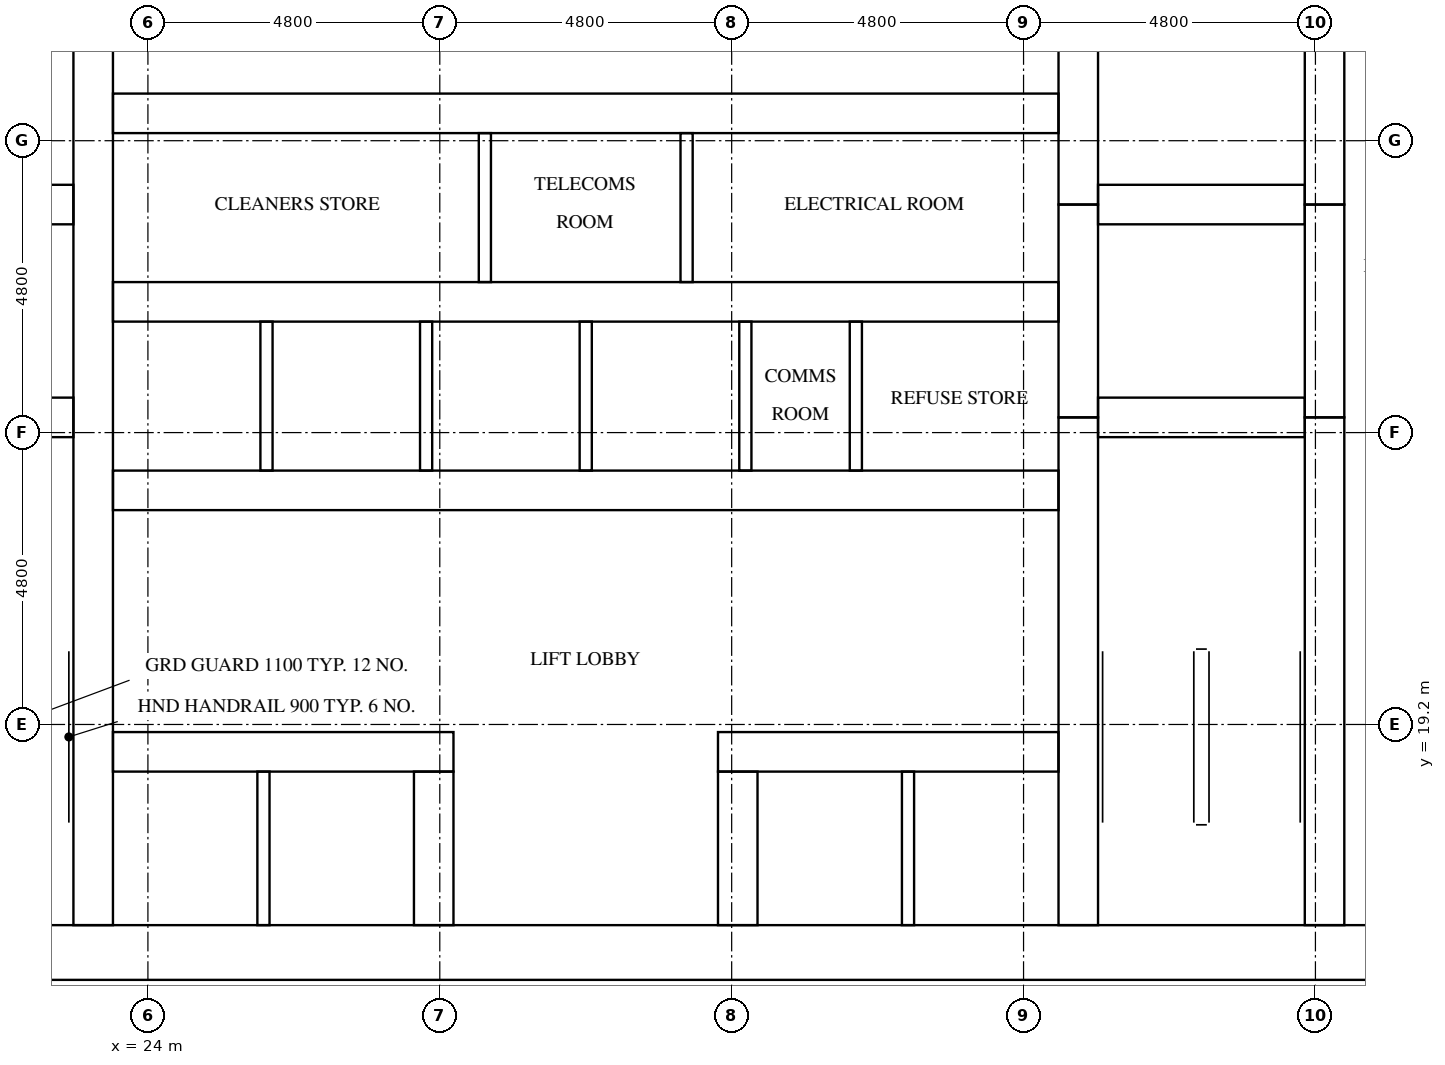
"""IFC4 building model, lengths in metres.
Left out: names, types, materials, properties, quantities, classifications, styles, units other than length and angle.
Written with IfcOpenShell. Run it as: python <this file> out.ifc"""

import sys

from ifc_helpers import new_model, si_unit, direction, frame, frame_2d, origin, place, context, subcontext, project, spatial, rectangle, extrude, element, fill, save


model = new_model("IFC4")
c1 = context("Model", 3, precision=1e-05, world=origin(), true_north=direction((0.0, 1.0)))
c2 = subcontext(c1, "Body", "Model", "MODEL_VIEW")
j1 = project(units=[si_unit("LENGTHUNIT", "METRE"), si_unit("PLANEANGLEUNIT", "RADIAN")], contexts=[c1])
p1 = place(None, origin())
s1 = spatial("IfcSite", under=j1, at=p1, CompositionType="ELEMENT")
p2 = place(p1, origin())
s2 = spatial("IfcBuilding", under=s1, at=p2, CompositionType="ELEMENT")
p3 = place(p2, frame((0.0, 0.0, 66.3)))
s3 = spatial("IfcBuildingStorey", under=s2, at=p3, CompositionType="ELEMENT", Elevation=66.3)
p4 = place(p3, frame((15.0, 15.45, 0.0), z_axis=(0.0, 0.0, 1.0), x_axis=(1.0, 0.0, 0.0)))
e1 = element("IfcWall", 1, at=p4, inside=s3, PredefinedType="SHEAR", context=c2, shape_type="SweptSolid", body=[
    extrude(rectangle(XDim=32.4, YDim=0.9, at=frame_2d((16.2, 0.0))), origin(), (0.0, 0.0, 1.0), 3.2),
])
p5 = place(p4, frame((15.3, 0.0, 0.0)))
e2 = element("IfcOpeningElement", 2, at=p5, cuts=e1, PredefinedType="OPENING", context=c2, shape_type="SweptSolid", body=[
    extrude(rectangle(XDim=1.8, YDim=2.1, at=frame_2d((0.9, 1.05))), frame((0.0, 0.46, 0.0), z_axis=(0.0, -1.0, 0.0), x_axis=(1.0, 0.0, 0.0)), (0.0, 0.0, 1.0), 0.92),
])
p6 = place(p3, frame((23.1, 15.9, 0.0), z_axis=(0.0, 0.0, 1.0), x_axis=(0.0, 1.0, 0.0)))
e3 = element("IfcWall", 3, at=p6, inside=s3, PredefinedType="SHEAR", context=c2, shape_type="SweptSolid", body=[
    extrude(rectangle(XDim=21.0, YDim=0.65, at=frame_2d((10.5, 0.0))), origin(), (0.0, 0.0, 1.0), 3.2),
])
p7 = place(p3, frame((39.3, 15.9, 0.0), z_axis=(0.0, 0.0, 1.0), x_axis=(0.0, 1.0, 0.0)))
e4 = element("IfcWall", 4, at=p7, inside=s3, PredefinedType="SHEAR", context=c2, shape_type="SweptSolid", body=[
    extrude(rectangle(XDim=8.35, YDim=0.65, at=frame_2d((4.175, 0.0))), origin(), (0.0, 0.0, 1.0), 3.2),
])
p8 = place(p3, frame((39.3, 24.25, 0.0), z_axis=(0.0, 0.0, 1.0), x_axis=(0.0, 1.0, 0.0)))
e5 = element("IfcWall", 5, at=p8, inside=s3, PredefinedType="SHEAR", context=c2, shape_type="SweptSolid", body=[
    extrude(rectangle(XDim=3.5, YDim=0.65, at=frame_2d((1.75, 0.0))), origin(), (0.0, 0.0, 1.0), 3.2),
])
p9 = place(p3, frame((39.3, 27.75, 0.0), z_axis=(0.0, 0.0, 1.0), x_axis=(0.0, 1.0, 0.0)))
e6 = element("IfcWall", 6, at=p9, inside=s3, PredefinedType="SHEAR", context=c2, shape_type="SweptSolid", body=[
    extrude(rectangle(XDim=9.15, YDim=0.65, at=frame_2d((4.575, 0.0))), origin(), (0.0, 0.0, 1.0), 3.2),
])
p10 = place(p3, frame((43.35, 15.9, 0.0), z_axis=(0.0, 0.0, 1.0), x_axis=(0.0, 1.0, 0.0)))
e7 = element("IfcWall", 7, at=p10, inside=s3, PredefinedType="SHEAR", context=c2, shape_type="SweptSolid", body=[
    extrude(rectangle(XDim=8.35, YDim=0.65, at=frame_2d((4.175, 0.0))), origin(), (0.0, 0.0, 1.0), 3.2),
])
p11 = place(p10, frame((0.3, 0.0, 0.0)))
e8 = element("IfcOpeningElement", 8, at=p11, cuts=e7, PredefinedType="OPENING", context=c2, shape_type="SweptSolid", body=[
    extrude(rectangle(XDim=1.2, YDim=2.1, at=frame_2d((0.6, 1.05))), frame((0.0, 0.335, 0.0), z_axis=(0.0, -1.0, 0.0), x_axis=(1.0, 0.0, 0.0)), (0.0, 0.0, 1.0), 0.67),
])
p12 = place(p3, frame((43.35, 24.25, 0.0), z_axis=(0.0, 0.0, 1.0), x_axis=(0.0, 1.0, 0.0)))
e9 = element("IfcWall", 9, at=p12, inside=s3, PredefinedType="SHEAR", context=c2, shape_type="SweptSolid", body=[
    extrude(rectangle(XDim=3.5, YDim=0.65, at=frame_2d((1.75, 0.0))), origin(), (0.0, 0.0, 1.0), 3.2),
])
p13 = place(p12, frame((1.2, 0.0, 0.0)))
e10 = element("IfcOpeningElement", 10, at=p13, cuts=e9, PredefinedType="OPENING", context=c2, shape_type="SweptSolid", body=[
    extrude(rectangle(XDim=1.1, YDim=2.1, at=frame_2d((0.55, 1.05))), frame((0.0, 0.335, 0.0), z_axis=(0.0, -1.0, 0.0), x_axis=(1.0, 0.0, 0.0)), (0.0, 0.0, 1.0), 0.67),
])
p14 = place(p3, frame((43.35, 27.75, 0.0), z_axis=(0.0, 0.0, 1.0), x_axis=(0.0, 1.0, 0.0)))
e11 = element("IfcWall", 11, at=p14, inside=s3, PredefinedType="SHEAR", context=c2, shape_type="SweptSolid", body=[
    extrude(rectangle(XDim=9.15, YDim=0.65, at=frame_2d((4.575, 0.0))), origin(), (0.0, 0.0, 1.0), 3.2),
])
p15 = place(p14, frame((7.65, 0.0, 0.0)))
e12 = element("IfcOpeningElement", 12, at=p15, cuts=e11, PredefinedType="OPENING", context=c2, shape_type="SweptSolid", body=[
    extrude(rectangle(XDim=1.2, YDim=2.1, at=frame_2d((0.6, 1.05))), frame((0.0, 0.335, 0.0), z_axis=(0.0, -1.0, 0.0), x_axis=(1.0, 0.0, 0.0)), (0.0, 0.0, 1.0), 0.67),
])
for number, where, z_axis, x_axis in (
    (13, (19.375, 24.25, 0.0), (0.0, 0.0, 1.0), (1.0, 0.0, 0.0)),
    (14, (19.375, 27.75, 0.0), (0.0, 0.0, 1.0), (1.0, 0.0, 0.0)),
    (15, (39.625, 24.25, 0.0), (0.0, 0.0, 1.0), (1.0, 0.0, 0.0)),
    (16, (39.625, 27.75, 0.0), (0.0, 0.0, 1.0), (1.0, 0.0, 0.0)),
):
    element("IfcWall", number, at=place(p3, frame(where, z_axis=z_axis, x_axis=x_axis)), inside=s3, PredefinedType="SHEAR", context=c2, shape_type="SweptSolid", body=[
        extrude(rectangle(XDim=3.4, YDim=0.65, at=frame_2d((1.7, 0.0))), origin(), (0.0, 0.0, 1.0), 3.2),
    ])
p16 = place(p3, frame((23.425, 18.75, 0.0), z_axis=(0.0, 0.0, 1.0), x_axis=(1.0, 0.0, 0.0)))
e17 = element("IfcWall", 17, at=p16, inside=s3, PredefinedType="SHEAR", context=c2, shape_type="SweptSolid", body=[
    extrude(rectangle(XDim=5.6, YDim=0.65, at=frame_2d((2.8, 0.0))), origin(), (0.0, 0.0, 1.0), 3.2),
])
p17 = place(p16, frame((0.637, 0.0, 0.0)))
e18 = element("IfcOpeningElement", 18, at=p17, cuts=e17, PredefinedType="OPENING", context=c2, shape_type="SweptSolid", body=[
    extrude(rectangle(XDim=1.1, YDim=2.1, at=frame_2d((0.55, 1.05))), frame((0.0, 0.335, 0.0), z_axis=(0.0, -1.0, 0.0), x_axis=(1.0, 0.0, 0.0)), (0.0, 0.0, 1.0), 0.67),
])
p18 = place(p16, frame((3.212, 0.0, 0.0)))
e19 = element("IfcOpeningElement", 19, at=p18, cuts=e17, PredefinedType="OPENING", context=c2, shape_type="SweptSolid", body=[
    extrude(rectangle(XDim=1.1, YDim=2.1, at=frame_2d((0.55, 1.05))), frame((0.0, 0.335, 0.0), z_axis=(0.0, -1.0, 0.0), x_axis=(1.0, 0.0, 0.0)), (0.0, 0.0, 1.0), 0.67),
])
p19 = place(p3, frame((33.375, 18.75, 0.0), z_axis=(0.0, 0.0, 1.0), x_axis=(1.0, 0.0, 0.0)))
e20 = element("IfcWall", 20, at=p19, inside=s3, PredefinedType="SHEAR", context=c2, shape_type="SweptSolid", body=[
    extrude(rectangle(XDim=5.6, YDim=0.65, at=frame_2d((2.8, 0.0))), origin(), (0.0, 0.0, 1.0), 3.2),
])
p20 = place(p19, frame((1.288, 0.0, 0.0)))
e21 = element("IfcOpeningElement", 21, at=p20, cuts=e20, PredefinedType="OPENING", context=c2, shape_type="SweptSolid", body=[
    extrude(rectangle(XDim=1.1, YDim=2.1, at=frame_2d((0.55, 1.05))), frame((0.0, 0.335, 0.0), z_axis=(0.0, -1.0, 0.0), x_axis=(1.0, 0.0, 0.0)), (0.0, 0.0, 1.0), 0.67),
])
p21 = place(p19, frame((3.863, 0.0, 0.0)))
e22 = element("IfcOpeningElement", 22, at=p21, cuts=e20, PredefinedType="OPENING", context=c2, shape_type="SweptSolid", body=[
    extrude(rectangle(XDim=1.1, YDim=2.1, at=frame_2d((0.55, 1.05))), frame((0.0, 0.335, 0.0), z_axis=(0.0, -1.0, 0.0), x_axis=(1.0, 0.0, 0.0)), (0.0, 0.0, 1.0), 0.67),
])
p22 = place(p3, frame((23.425, 23.05, 0.0), z_axis=(0.0, 0.0, 1.0), x_axis=(1.0, 0.0, 0.0)))
e23 = element("IfcWall", 23, at=p22, inside=s3, PredefinedType="SHEAR", context=c2, shape_type="SweptSolid", body=[
    extrude(rectangle(XDim=15.55, YDim=0.65, at=frame_2d((7.775, 0.0))), origin(), (0.0, 0.0, 1.0), 3.2),
])
p23 = place(p22, frame((0.663, 0.0, 0.0)))
e24 = element("IfcOpeningElement", 24, at=p23, cuts=e23, PredefinedType="OPENING", context=c2, shape_type="SweptSolid", body=[
    extrude(rectangle(XDim=1.1, YDim=2.1, at=frame_2d((0.55, 1.05))), frame((0.0, 0.335, 0.0), z_axis=(0.0, -1.0, 0.0), x_axis=(1.0, 0.0, 0.0)), (0.0, 0.0, 1.0), 0.67),
])
p24 = place(p22, frame((3.288, 0.0, 0.0)))
e25 = element("IfcOpeningElement", 25, at=p24, cuts=e23, PredefinedType="OPENING", context=c2, shape_type="SweptSolid", body=[
    extrude(rectangle(XDim=1.1, YDim=2.1, at=frame_2d((0.55, 1.05))), frame((0.0, 0.335, 0.0), z_axis=(0.0, -1.0, 0.0), x_axis=(1.0, 0.0, 0.0)), (0.0, 0.0, 1.0), 0.67),
])
p25 = place(p22, frame((10.809, 0.0, 0.0)))
e26 = element("IfcOpeningElement", 26, at=p25, cuts=e23, PredefinedType="OPENING", context=c2, shape_type="SweptSolid", body=[
    extrude(rectangle(XDim=1.0, YDim=2.1, at=frame_2d((0.5, 1.05))), frame((0.0, 0.335, 0.0), z_axis=(0.0, -1.0, 0.0), x_axis=(1.0, 0.0, 0.0)), (0.0, 0.0, 1.0), 0.67),
])
p26 = place(p22, frame((13.434, 0.0, 0.0)))
e27 = element("IfcOpeningElement", 27, at=p26, cuts=e23, PredefinedType="OPENING", context=c2, shape_type="SweptSolid", body=[
    extrude(rectangle(XDim=1.0, YDim=2.1, at=frame_2d((0.5, 1.05))), frame((0.0, 0.335, 0.0), z_axis=(0.0, -1.0, 0.0), x_axis=(1.0, 0.0, 0.0)), (0.0, 0.0, 1.0), 0.67),
])
p27 = place(p3, frame((23.425, 26.15, 0.0), z_axis=(0.0, 0.0, 1.0), x_axis=(1.0, 0.0, 0.0)))
e28 = element("IfcWall", 28, at=p27, inside=s3, PredefinedType="SHEAR", context=c2, shape_type="SweptSolid", body=[
    extrude(rectangle(XDim=15.55, YDim=0.65, at=frame_2d((7.775, 0.0))), origin(), (0.0, 0.0, 1.0), 3.2),
])
p28 = place(p3, frame((23.425, 29.25, 0.0), z_axis=(0.0, 0.0, 1.0), x_axis=(1.0, 0.0, 0.0)))
e29 = element("IfcWall", 29, at=p28, inside=s3, PredefinedType="SHEAR", context=c2, shape_type="SweptSolid", body=[
    extrude(rectangle(XDim=15.55, YDim=0.65, at=frame_2d((7.775, 0.0))), origin(), (0.0, 0.0, 1.0), 3.2),
])
p29 = place(p28, frame((2.508, 0.0, 0.0)))
e30 = element("IfcOpeningElement", 30, at=p29, cuts=e29, PredefinedType="OPENING", context=c2, shape_type="SweptSolid", body=[
    extrude(rectangle(XDim=1.0, YDim=2.1, at=frame_2d((0.5, 1.05))), frame((0.0, 0.335, 0.0), z_axis=(0.0, -1.0, 0.0), x_axis=(1.0, 0.0, 0.0)), (0.0, 0.0, 1.0), 0.67),
])
p30 = place(p28, frame((7.275, 0.0, 0.0)))
e31 = element("IfcOpeningElement", 31, at=p30, cuts=e29, PredefinedType="OPENING", context=c2, shape_type="SweptSolid", body=[
    extrude(rectangle(XDim=1.0, YDim=2.1, at=frame_2d((0.5, 1.05))), frame((0.0, 0.335, 0.0), z_axis=(0.0, -1.0, 0.0), x_axis=(1.0, 0.0, 0.0)), (0.0, 0.0, 1.0), 0.67),
])
p31 = place(p28, frame((12.042, 0.0, 0.0)))
e32 = element("IfcOpeningElement", 32, at=p31, cuts=e29, PredefinedType="OPENING", context=c2, shape_type="SweptSolid", body=[
    extrude(rectangle(XDim=1.0, YDim=2.1, at=frame_2d((0.5, 1.05))), frame((0.0, 0.335, 0.0), z_axis=(0.0, -1.0, 0.0), x_axis=(1.0, 0.0, 0.0)), (0.0, 0.0, 1.0), 0.67),
])
for number, where, z_axis, x_axis in (
    (33, (28.7, 15.9, 0.0), (0.0, 0.0, 1.0), (0.0, 1.0, 0.0)),
    (34, (33.7, 15.9, 0.0), (0.0, 0.0, 1.0), (0.0, 1.0, 0.0)),
):
    element("IfcWall", number, at=place(p3, frame(where, z_axis=z_axis, x_axis=x_axis)), inside=s3, PredefinedType="SHEAR", context=c2, shape_type="SweptSolid", body=[
        extrude(rectangle(XDim=2.525, YDim=0.65, at=frame_2d((1.263, 0.0))), origin(), (0.0, 0.0, 1.0), 3.2),
    ])
for number, where, z_axis, x_axis in (
    (35, (25.95, 23.375, 0.0), (0.0, 0.0, 1.0), (0.0, 1.0, 0.0)),
    (36, (28.575, 23.375, 0.0), (0.0, 0.0, 1.0), (0.0, 1.0, 0.0)),
    (37, (31.2, 23.375, 0.0), (0.0, 0.0, 1.0), (0.0, 1.0, 0.0)),
    (38, (33.825, 23.375, 0.0), (0.0, 0.0, 1.0), (0.0, 1.0, 0.0)),
):
    element("IfcWall", number, at=place(p3, frame(where, z_axis=z_axis, x_axis=x_axis)), inside=s3, PredefinedType="SOLIDWALL", context=c2, shape_type="SweptSolid", body=[
        extrude(rectangle(XDim=2.45, YDim=0.2, at=frame_2d((1.225, 0.0))), origin(), (0.0, 0.0, 1.0), 3.2),
    ])
for number, where, z_axis, x_axis in (
    (39, (25.9, 15.9, 0.0), (0.0, 0.0, 1.0), (0.0, 1.0, 0.0)),
    (40, (36.5, 15.9, 0.0), (0.0, 0.0, 1.0), (0.0, 1.0, 0.0)),
):
    element("IfcWall", number, at=place(p3, frame(where, z_axis=z_axis, x_axis=x_axis)), inside=s3, PredefinedType="SOLIDWALL", context=c2, shape_type="SweptSolid", body=[
        extrude(rectangle(XDim=2.525, YDim=0.2, at=frame_2d((1.263, 0.0))), origin(), (0.0, 0.0, 1.0), 3.2),
    ])
for number, where, z_axis, x_axis in (
    (41, (35.642, 23.375, 0.0), (0.0, 0.0, 1.0), (0.0, 1.0, 0.0)),
    (42, (29.541, 26.475, 0.0), (0.0, 0.0, 1.0), (0.0, 1.0, 0.0)),
    (43, (32.859, 26.475, 0.0), (0.0, 0.0, 1.0), (0.0, 1.0, 0.0)),
):
    element("IfcWall", number, at=place(p3, frame(where, z_axis=z_axis, x_axis=x_axis)), inside=s3, PredefinedType="PARTITIONING", context=c2, shape_type="SweptSolid", body=[
        extrude(rectangle(XDim=2.45, YDim=0.2, at=frame_2d((1.225, 0.0))), origin(), (0.0, 0.0, 1.0), 3.2),
    ])
p32 = place(p17, origin())
e44 = element("IfcDoor", 44, at=p32, inside=s3, OperationType="DOUBLE_DOOR_SLIDING", PredefinedType="DOOR", context=c2, shape_type="SweptSolid", body=[
    extrude(rectangle(XDim=1.1, YDim=2.1, at=frame_2d((0.55, 1.05))), frame((0.0, 0.025, 0.0), z_axis=(0.0, -1.0, 0.0), x_axis=(1.0, 0.0, 0.0)), (0.0, 0.0, 1.0), 0.05),
])
fill(e18, e44)
p33 = place(p18, origin())
e45 = element("IfcDoor", 45, at=p33, inside=s3, OperationType="DOUBLE_DOOR_SLIDING", PredefinedType="DOOR", context=c2, shape_type="SweptSolid", body=[
    extrude(rectangle(XDim=1.1, YDim=2.1, at=frame_2d((0.55, 1.05))), frame((0.0, 0.025, 0.0), z_axis=(0.0, -1.0, 0.0), x_axis=(1.0, 0.0, 0.0)), (0.0, 0.0, 1.0), 0.05),
])
fill(e19, e45)
p34 = place(p20, origin())
e46 = element("IfcDoor", 46, at=p34, inside=s3, OperationType="DOUBLE_DOOR_SLIDING", PredefinedType="DOOR", context=c2, shape_type="SweptSolid", body=[
    extrude(rectangle(XDim=1.1, YDim=2.1, at=frame_2d((0.55, 1.05))), frame((0.0, 0.025, 0.0), z_axis=(0.0, -1.0, 0.0), x_axis=(1.0, 0.0, 0.0)), (0.0, 0.0, 1.0), 0.05),
])
fill(e21, e46)
p35 = place(p21, origin())
e47 = element("IfcDoor", 47, at=p35, inside=s3, OperationType="DOUBLE_DOOR_SLIDING", PredefinedType="DOOR", context=c2, shape_type="SweptSolid", body=[
    extrude(rectangle(XDim=1.1, YDim=2.1, at=frame_2d((0.55, 1.05))), frame((0.0, 0.025, 0.0), z_axis=(0.0, -1.0, 0.0), x_axis=(1.0, 0.0, 0.0)), (0.0, 0.0, 1.0), 0.05),
])
fill(e22, e47)
p36 = place(p23, origin())
e48 = element("IfcDoor", 48, at=p36, inside=s3, OperationType="DOUBLE_DOOR_SLIDING", PredefinedType="DOOR", context=c2, shape_type="SweptSolid", body=[
    extrude(rectangle(XDim=1.1, YDim=2.1, at=frame_2d((0.55, 1.05))), frame((0.0, 0.025, 0.0), z_axis=(0.0, -1.0, 0.0), x_axis=(1.0, 0.0, 0.0)), (0.0, 0.0, 1.0), 0.05),
])
fill(e24, e48)
p37 = place(p24, origin())
e49 = element("IfcDoor", 49, at=p37, inside=s3, OperationType="DOUBLE_DOOR_SLIDING", PredefinedType="DOOR", context=c2, shape_type="SweptSolid", body=[
    extrude(rectangle(XDim=1.1, YDim=2.1, at=frame_2d((0.55, 1.05))), frame((0.0, 0.025, 0.0), z_axis=(0.0, -1.0, 0.0), x_axis=(1.0, 0.0, 0.0)), (0.0, 0.0, 1.0), 0.05),
])
fill(e25, e49)
p38 = place(p13, origin())
e50 = element("IfcDoor", 50, at=p38, inside=s3, OperationType="DOUBLE_DOOR_SLIDING", PredefinedType="DOOR", context=c2, shape_type="SweptSolid", body=[
    extrude(rectangle(XDim=1.1, YDim=2.1, at=frame_2d((0.55, 1.05))), frame((0.0, 0.025, 0.0), z_axis=(0.0, -1.0, 0.0), x_axis=(1.0, 0.0, 0.0)), (0.0, 0.0, 1.0), 0.05),
])
fill(e10, e50)
p39 = place(p11, origin())
e51 = element("IfcDoor", 51, at=p39, inside=s3, OperationType="SINGLE_SWING_LEFT", PredefinedType="DOOR", context=c2, shape_type="SweptSolid", body=[
    extrude(rectangle(XDim=1.2, YDim=2.1, at=frame_2d((0.6, 1.05))), frame((0.0, 0.025, 0.0), z_axis=(0.0, -1.0, 0.0), x_axis=(1.0, 0.0, 0.0)), (0.0, 0.0, 1.0), 0.05),
])
fill(e8, e51)
p40 = place(p5, frame((1.8, 0.0, 0.0), z_axis=(0.0, 0.0, 1.0), x_axis=(-1.0, 0.0, 0.0)))
e52 = element("IfcDoor", 52, at=p40, inside=s3, OperationType="DOUBLE_DOOR_SINGLE_SWING", PredefinedType="DOOR", context=c2, shape_type="SweptSolid", body=[
    extrude(rectangle(XDim=1.8, YDim=2.1, at=frame_2d((0.9, 1.05))), frame((0.0, 0.025, 0.0), z_axis=(0.0, -1.0, 0.0), x_axis=(1.0, 0.0, 0.0)), (0.0, 0.0, 1.0), 0.05),
])
fill(e2, e52)
p41 = place(p25, frame((1.0, 0.0, 0.0), z_axis=(0.0, 0.0, 1.0), x_axis=(-1.0, 0.0, 0.0)))
e53 = element("IfcDoor", 53, at=p41, inside=s3, OperationType="SINGLE_SWING_LEFT", PredefinedType="DOOR", context=c2, shape_type="SweptSolid", body=[
    extrude(rectangle(XDim=1.0, YDim=2.1, at=frame_2d((0.5, 1.05))), frame((0.0, 0.025, 0.0), z_axis=(0.0, -1.0, 0.0), x_axis=(1.0, 0.0, 0.0)), (0.0, 0.0, 1.0), 0.05),
])
fill(e26, e53)
p42 = place(p26, frame((1.0, 0.0, 0.0), z_axis=(0.0, 0.0, 1.0), x_axis=(-1.0, 0.0, 0.0)))
e54 = element("IfcDoor", 54, at=p42, inside=s3, OperationType="SINGLE_SWING_RIGHT", PredefinedType="DOOR", context=c2, shape_type="SweptSolid", body=[
    extrude(rectangle(XDim=1.0, YDim=2.1, at=frame_2d((0.5, 1.05))), frame((0.0, 0.025, 0.0), z_axis=(0.0, -1.0, 0.0), x_axis=(1.0, 0.0, 0.0)), (0.0, 0.0, 1.0), 0.05),
])
fill(e27, e54)
p43 = place(p29, origin())
e55 = element("IfcDoor", 55, at=p43, inside=s3, OperationType="SINGLE_SWING_LEFT", PredefinedType="DOOR", context=c2, shape_type="SweptSolid", body=[
    extrude(rectangle(XDim=1.0, YDim=2.1, at=frame_2d((0.5, 1.05))), frame((0.0, 0.025, 0.0), z_axis=(0.0, -1.0, 0.0), x_axis=(1.0, 0.0, 0.0)), (0.0, 0.0, 1.0), 0.05),
])
fill(e30, e55)
p44 = place(p30, origin())
e56 = element("IfcDoor", 56, at=p44, inside=s3, OperationType="SINGLE_SWING_RIGHT", PredefinedType="DOOR", context=c2, shape_type="SweptSolid", body=[
    extrude(rectangle(XDim=1.0, YDim=2.1, at=frame_2d((0.5, 1.05))), frame((0.0, 0.025, 0.0), z_axis=(0.0, -1.0, 0.0), x_axis=(1.0, 0.0, 0.0)), (0.0, 0.0, 1.0), 0.05),
])
fill(e31, e56)
p45 = place(p31, origin())
e57 = element("IfcDoor", 57, at=p45, inside=s3, OperationType="SINGLE_SWING_LEFT", PredefinedType="DOOR", context=c2, shape_type="SweptSolid", body=[
    extrude(rectangle(XDim=1.0, YDim=2.1, at=frame_2d((0.5, 1.05))), frame((0.0, 0.025, 0.0), z_axis=(0.0, -1.0, 0.0), x_axis=(1.0, 0.0, 0.0)), (0.0, 0.0, 1.0), 0.05),
])
fill(e32, e57)
save(model, sys.argv[1])
